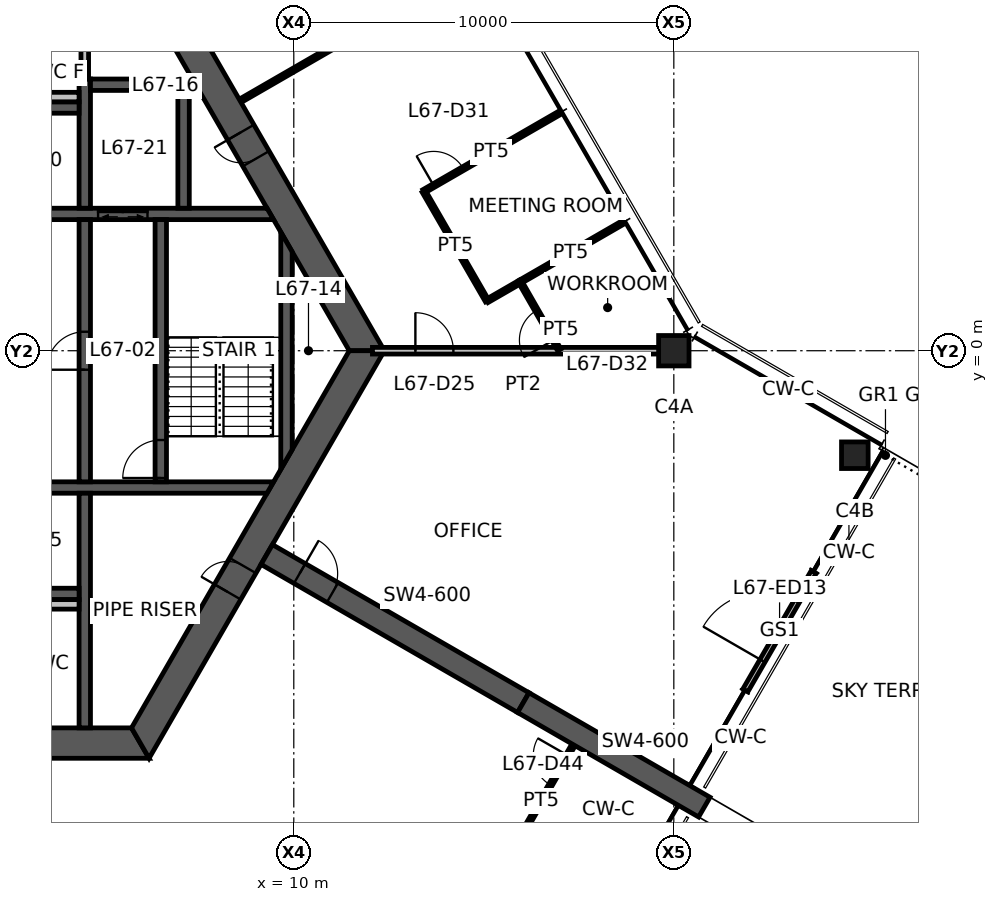
"""IFC4 building model, lengths in metres.
Left out: names, types, materials, properties, quantities, classifications, styles, units other than length and angle.
Written with IfcOpenShell. Run it as: python <this file> out.ifc"""

import sys

from ifc_helpers import new_model, si_unit, direction, frame, frame_2d, origin, origin_2d, place, context, subcontext, project, spatial, polyline, rectangle, hollow_rectangle, outline, extrude, element, fill, save


model = new_model("IFC4")
c1 = context("Model", 3, precision=1e-05, world=origin(), true_north=direction((0.0, 1.0)))
c2 = subcontext(c1, "Body", "Model", "MODEL_VIEW")
j1 = project(units=[si_unit("LENGTHUNIT", "METRE"), si_unit("PLANEANGLEUNIT", "RADIAN")], contexts=[c1])
p1 = place(None, origin())
s1 = spatial("IfcSite", under=j1, at=p1, CompositionType="ELEMENT")
p2 = place(p1, origin())
s2 = spatial("IfcBuilding", under=s1, at=p2, CompositionType="ELEMENT")
p3 = place(p2, frame((0.0, 0.0, 267.4)))
s3 = spatial("IfcBuildingStorey", under=s2, at=p3, CompositionType="ELEMENT", Elevation=267.4)
p4 = place(p3, frame((20.0, 0.0, 0.0), z_axis=(0.0, 0.0, 1.0), x_axis=(1.0, 0.0, 0.0)))
e1 = element("IfcColumn", 1, at=p4, inside=s3, PredefinedType="COLUMN", context=c2, shape_type="SweptSolid", body=[
    extrude(hollow_rectangle(XDim=0.8, YDim=0.8, WallThickness=0.04, at=origin_2d()), origin(), (0.0, 0.0, 1.0), 3.9),
])
p5 = place(p3, frame((24.763, -2.75, 0.0), z_axis=(0.0, 0.0, 1.0), x_axis=(1.0, 0.0, 0.0)))
e2 = element("IfcColumn", 2, at=p5, inside=s3, PredefinedType="COLUMN", context=c2, shape_type="SweptSolid", body=[
    extrude(hollow_rectangle(XDim=0.7, YDim=0.7, WallThickness=0.032, at=origin_2d()), origin(), (0.0, 0.0, 1.0), 3.9),
])
p6 = place(p3, frame((11.922, 0.0, 0.0), z_axis=(0.0, 0.0, 1.0), x_axis=(-0.500004296715, 0.866022923061, 0.0)))
e3 = element("IfcWall", 3, at=p6, inside=s3, PredefinedType="SHEAR", context=c2, shape_type="SweptSolid", body=[
    extrude(outline(polyline([(-0.231, -0.4), (5.835, -0.4), (6.635, -0.4), (12.153, -0.4), (11.691, 0.4), (6.635, 0.4), (5.835, 0.4), (0.231, 0.4), (-0.231, -0.4)])), origin(), (0.0, 0.0, 1.0), 3.9),
])
p7 = place(p6, frame((5.835, 0.0, 0.0)))
e4 = element("IfcOpeningElement", 4, at=p7, cuts=e3, PredefinedType="OPENING", context=c2, shape_type="SweptSolid", body=[
    extrude(rectangle(XDim=0.8, YDim=2.1, at=frame_2d((0.4, 1.05))), frame((0.0, 0.41, 0.0), z_axis=(0.0, -1.0, 0.0), x_axis=(1.0, 0.0, 0.0)), (0.0, 0.0, 1.0), 0.82),
])
p8 = place(p3, frame((-5.961, -10.325, 0.0), z_axis=(0.0, 0.0, 1.0), x_axis=(1.0, 0.0, 0.0)))
e5 = element("IfcWall", 5, at=p8, inside=s3, PredefinedType="SHEAR", context=c2, shape_type="SweptSolid", body=[
    extrude(outline(polyline([(-0.231, -0.4), (5.461, -0.4), (6.461, -0.4), (12.153, -0.4), (11.691, 0.4), (6.461, 0.4), (5.461, 0.4), (0.231, 0.4), (-0.231, -0.4)])), origin(), (0.0, 0.0, 1.0), 3.9),
])
p9 = place(p8, frame((5.461, 0.0, 0.0)))
e6 = element("IfcOpeningElement", 6, at=p9, cuts=e5, PredefinedType="OPENING", context=c2, shape_type="SweptSolid", body=[
    extrude(rectangle(XDim=1.0, YDim=2.1, at=frame_2d((0.5, 1.05))), frame((0.0, 0.41, 0.0), z_axis=(0.0, -1.0, 0.0), x_axis=(1.0, 0.0, 0.0)), (0.0, 0.0, 1.0), 0.82),
])
p10 = place(p3, frame((5.961, -10.325, 0.0), z_axis=(0.0, 0.0, 1.0), x_axis=(0.500004296715, 0.866022923061, 0.0)))
e7 = element("IfcWall", 7, at=p10, inside=s3, PredefinedType="SHEAR", context=c2, shape_type="SweptSolid", body=[
    extrude(outline(polyline([(-0.231, -0.4), (4.594, -0.4), (5.394, -0.4), (12.153, -0.4), (11.691, 0.4), (5.394, 0.4), (4.594, 0.4), (0.231, 0.4), (-0.231, -0.4)])), origin(), (0.0, 0.0, 1.0), 3.9),
])
p11 = place(p10, frame((4.594, 0.0, 0.0)))
e8 = element("IfcOpeningElement", 8, at=p11, cuts=e7, PredefinedType="OPENING", context=c2, shape_type="SweptSolid", body=[
    extrude(rectangle(XDim=0.8, YDim=2.1, at=frame_2d((0.4, 1.05))), frame((0.0, 0.41, 0.0), z_axis=(0.0, -1.0, 0.0), x_axis=(1.0, 0.0, 0.0)), (0.0, 0.0, 1.0), 0.82),
])
p12 = place(p3, frame((9.288, -5.363, 0.0), z_axis=(0.0, 0.0, 1.0), x_axis=(0.866031736626, -0.499989031036, 0.0)))
e9 = element("IfcWall", 9, at=p12, inside=s3, PredefinedType="SHEAR", context=c2, shape_type="SweptSolid", body=[
    extrude(rectangle(XDim=7.796, YDim=0.6, at=frame_2d((3.898, 0.0))), origin(), (0.0, 0.0, 1.0), 3.9),
])
p13 = place(p12, frame((1.0, 0.0, 0.0)))
e10 = element("IfcOpeningElement", 10, at=p13, cuts=e9, PredefinedType="OPENING", context=c2, shape_type="SweptSolid", body=[
    extrude(rectangle(XDim=1.0, YDim=2.1, at=frame_2d((0.5, 1.05))), frame((0.0, 0.31, 0.0), z_axis=(0.0, -1.0, 0.0), x_axis=(1.0, 0.0, 0.0)), (0.0, 0.0, 1.0), 0.62),
])
p14 = place(p3, frame((16.039, -9.26, 0.0), z_axis=(0.0, 0.0, 1.0), x_axis=(0.866027397988, -0.499996545922, 0.0)))
e11 = element("IfcWall", 11, at=p14, inside=s3, PredefinedType="SHEAR", context=c2, shape_type="SweptSolid", body=[
    extrude(rectangle(XDim=5.5, YDim=0.6, at=frame_2d((2.75, 0.0))), origin(), (0.0, 0.0, 1.0), 3.9),
])
p15 = place(p3, frame((21.883, -8.939, 0.0), z_axis=(0.0, 0.0, 1.0), x_axis=(0.500012057535, 0.866018442252, 0.0)))
e12 = element("IfcWall", 12, at=p15, inside=s3, PredefinedType="STANDARD", context=c2, shape_type="SweptSolid", body=[
    extrude(rectangle(XDim=3.6, YDim=0.15, at=frame_2d((1.8, 0.0))), origin(), (0.0, 0.0, 1.0), 3.9),
])
p16 = place(p15, frame((0.9, 0.0, 0.0)))
e13 = element("IfcOpeningElement", 13, at=p16, cuts=e12, PredefinedType="OPENING", context=c2, shape_type="SweptSolid", body=[
    extrude(rectangle(XDim=1.8, YDim=2.1, at=frame_2d((0.9, 1.05))), frame((0.0, 0.085, 0.0), z_axis=(0.0, -1.0, 0.0), x_axis=(1.0, 0.0, 0.0)), (0.0, 0.0, 1.0), 0.17),
])
p17 = place(p3, frame((1.45, 3.6, 0.0), z_axis=(0.0, 0.0, 1.0), x_axis=(1.0, 0.0, 0.0)))
e14 = element("IfcWall", 14, at=p17, inside=s3, PredefinedType="SHEAR", context=c2, shape_type="SweptSolid", body=[
    extrude(outline(polyline([(0.0, -0.15), (1.15, -0.15), (2.05, -0.15), (3.4, -0.15), (4.7, -0.15), (8.019, -0.15), (7.845, 0.15), (4.7, 0.15), (3.4, 0.15), (2.05, 0.15), (1.15, 0.15), (0.0, 0.15), (0.0, -0.15)])), origin(), (0.0, 0.0, 1.0), 3.9),
])
p18 = place(p17, frame((1.15, 0.0, 0.0)))
e15 = element("IfcOpeningElement", 15, at=p18, cuts=e14, PredefinedType="OPENING", context=c2, shape_type="SweptSolid", body=[
    extrude(rectangle(XDim=0.9, YDim=2.1, at=frame_2d((0.45, 1.05))), frame((0.0, 0.16, 0.0), z_axis=(0.0, -1.0, 0.0), x_axis=(1.0, 0.0, 0.0)), (0.0, 0.0, 1.0), 0.32),
])
p19 = place(p17, frame((3.4, 0.0, 0.0)))
e16 = element("IfcOpeningElement", 16, at=p19, cuts=e14, PredefinedType="OPENING", context=c2, shape_type="SweptSolid", body=[
    extrude(rectangle(XDim=1.3, YDim=2.1, at=frame_2d((0.65, 1.05))), frame((0.0, 0.16, 0.0), z_axis=(0.0, -1.0, 0.0), x_axis=(1.0, 0.0, 0.0)), (0.0, 0.0, 1.0), 0.32),
])
p20 = place(p3, frame((1.45, -3.6, 0.0), z_axis=(0.0, 0.0, 1.0), x_axis=(1.0, 0.0, 0.0)))
e17 = element("IfcWall", 17, at=p20, inside=s3, PredefinedType="SHEAR", context=c2, shape_type="SweptSolid", body=[
    extrude(outline(polyline([(0.0, -0.15), (1.05, -0.15), (2.15, -0.15), (7.845, -0.15), (8.019, 0.15), (2.15, 0.15), (1.05, 0.15), (0.0, 0.15), (0.0, -0.15)])), origin(), (0.0, 0.0, 1.0), 3.9),
])
p21 = place(p20, frame((1.05, 0.0, 0.0)))
e18 = element("IfcOpeningElement", 18, at=p21, cuts=e17, PredefinedType="OPENING", context=c2, shape_type="SweptSolid", body=[
    extrude(rectangle(XDim=1.1, YDim=2.1, at=frame_2d((0.55, 1.05))), frame((0.0, 0.16, 0.0), z_axis=(0.0, -1.0, 0.0), x_axis=(1.0, 0.0, 0.0)), (0.0, 0.0, 1.0), 0.32),
])
p22 = place(p3, frame((4.5, -3.45, 0.0), z_axis=(0.0, 0.0, 1.0), x_axis=(0.0, 1.0, 0.0)))
e19 = element("IfcWall", 19, at=p22, inside=s3, PredefinedType="SHEAR", context=c2, shape_type="SweptSolid", body=[
    extrude(rectangle(XDim=6.9, YDim=0.3, at=frame_2d((3.45, 0.0))), origin(), (0.0, 0.0, 1.0), 3.9),
])
p23 = place(p22, frame((2.95, 0.0, 0.0)))
e20 = element("IfcOpeningElement", 20, at=p23, cuts=e19, PredefinedType="OPENING", context=c2, shape_type="SweptSolid", body=[
    extrude(rectangle(XDim=1.0, YDim=2.1, at=frame_2d((0.5, 1.05))), frame((0.0, 0.16, 0.0), z_axis=(0.0, -1.0, 0.0), x_axis=(1.0, 0.0, 0.0)), (0.0, 0.0, 1.0), 0.32),
])
p24 = place(p3, frame((6.5, -3.45, 0.0), z_axis=(0.0, 0.0, 1.0), x_axis=(0.0, 1.0, 0.0)))
e21 = element("IfcWall", 21, at=p24, inside=s3, PredefinedType="SHEAR", context=c2, shape_type="SweptSolid", body=[
    extrude(rectangle(XDim=6.9, YDim=0.3, at=frame_2d((3.45, 0.0))), origin(), (0.0, 0.0, 1.0), 3.9),
])
p25 = place(p24, frame((0.1, 0.0, 0.0)))
e22 = element("IfcOpeningElement", 22, at=p25, cuts=e21, PredefinedType="OPENING", context=c2, shape_type="SweptSolid", body=[
    extrude(rectangle(XDim=1.0, YDim=2.1, at=frame_2d((0.5, 1.05))), frame((0.0, 0.16, 0.0), z_axis=(0.0, -1.0, 0.0), x_axis=(1.0, 0.0, 0.0)), (0.0, 0.0, 1.0), 0.32),
])
p26 = place(p3, frame((4.5, 3.75, 0.0), z_axis=(0.0, 0.0, 1.0), x_axis=(0.0, 1.0, 0.0)))
e23 = element("IfcWall", 23, at=p26, inside=s3, PredefinedType="SHEAR", context=c2, shape_type="SweptSolid", body=[
    extrude(rectangle(XDim=3.4, YDim=0.3, at=frame_2d((1.7, 0.0))), origin(), (0.0, 0.0, 1.0), 3.9),
])
p27 = place(p3, frame((4.5, -3.75, 0.0), z_axis=(0.0, 0.0, 1.0), x_axis=(0.0, -1.0, 0.0)))
e24 = element("IfcWall", 24, at=p27, inside=s3, PredefinedType="SHEAR", context=c2, shape_type="SweptSolid", body=[
    extrude(rectangle(XDim=6.175, YDim=0.3, at=frame_2d((3.087, 0.0))), origin(), (0.0, 0.0, 1.0), 3.9),
])
for number, where, z_axis, x_axis in (
    (25, (1.75, 6.4, 0.0), (0.0, 0.0, 1.0), (1.0, 0.0, 0.0)),
    (26, (1.75, -6.4, 0.0), (0.0, 0.0, 1.0), (1.0, 0.0, 0.0)),
    (27, (4.65, 7.0, 0.0), (0.0, 0.0, 1.0), (1.0, 0.0, 0.0)),
):
    element("IfcWall", number, at=place(p3, frame(where, z_axis=z_axis, x_axis=x_axis)), inside=s3, PredefinedType="SHEAR", context=c2, shape_type="SweptSolid", body=[
        extrude(rectangle(XDim=2.6, YDim=0.3, at=frame_2d((1.3, 0.0))), origin(), (0.0, 0.0, 1.0), 3.9),
    ])
p28 = place(p3, frame((7.1, 3.75, 0.0), z_axis=(0.0, 0.0, 1.0), x_axis=(0.0, 1.0, 0.0)))
e28 = element("IfcWall", 28, at=p28, inside=s3, PredefinedType="SHEAR", context=c2, shape_type="SweptSolid", body=[
    extrude(rectangle(XDim=3.1, YDim=0.3, at=frame_2d((1.55, 0.0))), origin(), (0.0, 0.0, 1.0), 3.9),
])
p29 = place(p3, frame((9.808, -2.862, 0.0), z_axis=(0.0, 0.0, 1.0), x_axis=(0.0, 1.0, 0.0)))
e29 = element("IfcWall", 29, at=p29, inside=s3, PredefinedType="SHEAR", context=c2, shape_type="SweptSolid", body=[
    extrude(outline(polyline([(0.26, -0.15), (5.465, -0.15), (5.984, 0.15), (-0.26, 0.15), (0.26, -0.15)])), origin(), (0.0, 0.0, 1.0), 3.9),
])
p30 = place(p3, frame((4.5, 7.15, 0.0), z_axis=(0.0, 0.0, 1.0), x_axis=(0.0, 1.0, 0.0)))
e30 = element("IfcWall", 30, at=p30, inside=s3, PredefinedType="STANDARD", context=c2, shape_type="SweptSolid", body=[
    extrude(rectangle(XDim=2.775, YDim=0.2, at=frame_2d((1.388, 0.0))), origin(), (0.0, 0.0, 1.0), 3.9),
])
for number, where, z_axis, x_axis in (
    (31, (1.75, 6.675, 0.0), (0.0, 0.0, 1.0), (1.0, 0.0, 0.0)),
    (32, (1.75, -6.675, 0.0), (0.0, 0.0, 1.0), (1.0, 0.0, 0.0)),
):
    element("IfcWall", number, at=place(p3, frame(where, z_axis=z_axis, x_axis=x_axis)), inside=s3, PredefinedType="PLUMBINGWALL", context=c2, shape_type="SweptSolid", body=[
        extrude(rectangle(XDim=2.6, YDim=0.25, at=frame_2d((1.3, 0.0))), origin(), (0.0, 0.0, 1.0), 3.9),
    ])
p31 = place(p3, frame((12.07, 0.0, 0.0), z_axis=(0.0, 0.0, 1.0), x_axis=(1.0, 0.0, 0.0)))
e33 = element("IfcWall", 33, at=p31, inside=s3, PredefinedType="PARTITIONING", context=c2, shape_type="SweptSolid", body=[
    extrude(rectangle(XDim=7.93, YDim=0.175, at=frame_2d((3.965, 0.0))), origin(), (0.0, 0.0, 1.0), 3.05),
])
p32 = place(p31, frame((1.13, 0.0, 0.0)))
e34 = element("IfcOpeningElement", 34, at=p32, cuts=e33, PredefinedType="OPENING", context=c2, shape_type="SweptSolid", body=[
    extrude(rectangle(XDim=1.0, YDim=2.1, at=frame_2d((0.5, 1.05))), frame((0.0, 0.098, 0.0), z_axis=(0.0, -1.0, 0.0), x_axis=(1.0, 0.0, 0.0)), (0.0, 0.0, 1.0), 0.195),
])
p33 = place(p3, frame((11.013, 7.975, 0.0), z_axis=(0.0, 0.0, 1.0), x_axis=(-0.86603494908, -0.499983466698, 0.0)))
e35 = element("IfcWall", 35, at=p33, inside=s3, PredefinedType="PARTITIONING", context=c2, shape_type="SweptSolid", body=[
    extrude(rectangle(XDim=2.78, YDim=0.1, at=frame_2d((1.39, 0.0))), origin(), (0.0, 0.0, 1.0), 2.95),
])
p34 = place(p3, frame((18.62, 3.351, 0.0), z_axis=(0.0, 0.0, 1.0), x_axis=(-0.866043267704, -0.499969057507, 0.0)))
e36 = element("IfcWall", 36, at=p34, inside=s3, PredefinedType="PARTITIONING", context=c2, shape_type="SweptSolid", body=[
    extrude(rectangle(XDim=3.085, YDim=0.1, at=frame_2d((1.542, 0.0))), origin(), (0.0, 0.0, 1.0), 2.95),
])
p35 = place(p3, frame((13.421, 4.195, 0.0), z_axis=(0.0, 0.0, 1.0), x_axis=(0.866045435662, 0.499965302165, 0.0)))
e37 = element("IfcWall", 37, at=p35, inside=s3, PredefinedType="PARTITIONING", context=c2, shape_type="SweptSolid", body=[
    extrude(rectangle(XDim=4.09, YDim=0.1, at=frame_2d((2.045, 0.0))), origin(), (0.0, 0.0, 1.0), 2.95),
])
p36 = place(p35, frame((0.3, 0.0, 0.0)))
e38 = element("IfcOpeningElement", 38, at=p36, cuts=e37, PredefinedType="OPENING", context=c2, shape_type="SweptSolid", body=[
    extrude(rectangle(XDim=0.9, YDim=2.1, at=frame_2d((0.45, 1.05))), frame((0.0, 0.06, 0.0), z_axis=(0.0, -1.0, 0.0), x_axis=(1.0, 0.0, 0.0)), (0.0, 0.0, 1.0), 0.12),
])
p37 = place(p3, frame((15.086, 1.311, 0.0), z_axis=(0.0, 0.0, 1.0), x_axis=(-0.500001606164, 0.866024476463, 0.0)))
e39 = element("IfcWall", 39, at=p37, inside=s3, PredefinedType="PARTITIONING", context=c2, shape_type="SweptSolid", body=[
    extrude(rectangle(XDim=3.331, YDim=0.1, at=frame_2d((1.666, 0.0))), origin(), (0.0, 0.0, 1.0), 2.95),
])
p38 = place(p3, frame((15.956, 1.813, 0.0), z_axis=(0.0, 0.0, 1.0), x_axis=(-0.866035824272, -0.499981950752, 0.0)))
e40 = element("IfcWall", 40, at=p38, inside=s3, PredefinedType="PARTITIONING", context=c2, shape_type="SweptSolid", body=[
    extrude(rectangle(XDim=1.004, YDim=0.1, at=frame_2d((0.502, 0.0))), origin(), (0.0, 0.0, 1.0), 2.95),
])
p39 = place(p3, frame((16.986, 0.02, 0.0), z_axis=(0.0, 0.0, 1.0), x_axis=(-0.498096123952, 0.867121820337, 0.0)))
e41 = element("IfcWall", 41, at=p39, inside=s3, PredefinedType="PARTITIONING", context=c2, shape_type="SweptSolid", body=[
    extrude(rectangle(XDim=2.067, YDim=0.1, at=frame_2d((1.034, 0.0))), origin(), (0.0, 0.0, 1.0), 2.95),
])
p40 = place(p39, frame((0.3, 0.0, 0.0)))
e42 = element("IfcOpeningElement", 42, at=p40, cuts=e41, PredefinedType="OPENING", context=c2, shape_type="SweptSolid", body=[
    extrude(rectangle(XDim=0.9, YDim=2.1, at=frame_2d((0.45, 1.05))), frame((0.0, 0.06, 0.0), z_axis=(0.0, -1.0, 0.0), x_axis=(1.0, 0.0, 0.0)), (0.0, 0.0, 1.0), 0.12),
])
p41 = place(p3, frame((15.665, -13.317, 0.0), z_axis=(0.0, 0.0, 1.0), x_axis=(0.498882251571, 0.866669775098, 0.0)))
e43 = element("IfcWall", 43, at=p41, inside=s3, PredefinedType="PARTITIONING", context=c2, shape_type="SweptSolid", body=[
    extrude(rectangle(XDim=3.38, YDim=0.1, at=frame_2d((1.69, 0.0))), origin(), (0.0, 0.0, 1.0), 2.95),
])
p42 = place(p41, frame((2.18, 0.0, 0.0)))
e44 = element("IfcOpeningElement", 44, at=p42, cuts=e43, PredefinedType="OPENING", context=c2, shape_type="SweptSolid", body=[
    extrude(rectangle(XDim=0.9, YDim=2.1, at=frame_2d((0.45, 1.05))), frame((0.0, 0.06, 0.0), z_axis=(0.0, -1.0, 0.0), x_axis=(1.0, 0.0, 0.0)), (0.0, 0.0, 1.0), 0.12),
])
p43 = place(p16, origin())
e45 = element("IfcDoor", 45, at=p43, inside=s3, OperationType="DOUBLE_DOOR_SINGLE_SWING", PredefinedType="DOOR", context=c2, shape_type="SweptSolid", body=[
    extrude(rectangle(XDim=1.8, YDim=2.1, at=frame_2d((0.9, 1.05))), frame((0.0, 0.025, 0.0), z_axis=(0.0, -1.0, 0.0), x_axis=(1.0, 0.0, 0.0)), (0.0, 0.0, 1.0), 0.05),
])
fill(e13, e45)
p44 = place(p7, origin())
e46 = element("IfcDoor", 46, at=p44, inside=s3, OperationType="SINGLE_SWING_RIGHT", PredefinedType="DOOR", context=c2, shape_type="SweptSolid", body=[
    extrude(rectangle(XDim=0.8, YDim=2.1, at=frame_2d((0.4, 1.05))), frame((0.0, 0.025, 0.0), z_axis=(0.0, -1.0, 0.0), x_axis=(1.0, 0.0, 0.0)), (0.0, 0.0, 1.0), 0.05),
])
fill(e4, e46)
p45 = place(p11, origin())
e47 = element("IfcDoor", 47, at=p45, inside=s3, OperationType="SINGLE_SWING_LEFT", PredefinedType="DOOR", context=c2, shape_type="SweptSolid", body=[
    extrude(rectangle(XDim=0.8, YDim=2.1, at=frame_2d((0.4, 1.05))), frame((0.0, 0.025, 0.0), z_axis=(0.0, -1.0, 0.0), x_axis=(1.0, 0.0, 0.0)), (0.0, 0.0, 1.0), 0.05),
])
fill(e8, e47)
p46 = place(p23, origin())
e48 = element("IfcDoor", 48, at=p46, inside=s3, OperationType="SINGLE_SWING_LEFT", PredefinedType="DOOR", context=c2, shape_type="SweptSolid", body=[
    extrude(rectangle(XDim=1.0, YDim=2.1, at=frame_2d((0.5, 1.05))), frame((0.0, 0.025, 0.0), z_axis=(0.0, -1.0, 0.0), x_axis=(1.0, 0.0, 0.0)), (0.0, 0.0, 1.0), 0.05),
])
fill(e20, e48)
p47 = place(p25, origin())
e49 = element("IfcDoor", 49, at=p47, inside=s3, OperationType="SINGLE_SWING_LEFT", PredefinedType="DOOR", context=c2, shape_type="SweptSolid", body=[
    extrude(rectangle(XDim=1.0, YDim=2.1, at=frame_2d((0.5, 1.05))), frame((0.0, 0.025, 0.0), z_axis=(0.0, -1.0, 0.0), x_axis=(1.0, 0.0, 0.0)), (0.0, 0.0, 1.0), 0.05),
])
fill(e22, e49)
p48 = place(p13, origin())
e50 = element("IfcDoor", 50, at=p48, inside=s3, OperationType="SINGLE_SWING_LEFT", PredefinedType="DOOR", context=c2, shape_type="SweptSolid", body=[
    extrude(rectangle(XDim=1.0, YDim=2.1, at=frame_2d((0.5, 1.05))), frame((0.0, 0.025, 0.0), z_axis=(0.0, -1.0, 0.0), x_axis=(1.0, 0.0, 0.0)), (0.0, 0.0, 1.0), 0.05),
])
fill(e10, e50)
p49 = place(p32, origin())
e51 = element("IfcDoor", 51, at=p49, inside=s3, OperationType="SINGLE_SWING_LEFT", PredefinedType="DOOR", context=c2, shape_type="SweptSolid", body=[
    extrude(rectangle(XDim=1.0, YDim=2.1, at=frame_2d((0.5, 1.05))), frame((0.0, 0.025, 0.0), z_axis=(0.0, -1.0, 0.0), x_axis=(1.0, 0.0, 0.0)), (0.0, 0.0, 1.0), 0.05),
])
fill(e34, e51)
p50 = place(p36, origin())
e52 = element("IfcDoor", 52, at=p50, inside=s3, OperationType="SINGLE_SWING_LEFT", PredefinedType="DOOR", context=c2, shape_type="SweptSolid", body=[
    extrude(rectangle(XDim=0.9, YDim=2.1, at=frame_2d((0.45, 1.05))), frame((0.0, 0.025, 0.0), z_axis=(0.0, -1.0, 0.0), x_axis=(1.0, 0.0, 0.0)), (0.0, 0.0, 1.0), 0.05),
])
fill(e38, e52)
p51 = place(p40, origin())
e53 = element("IfcDoor", 53, at=p51, inside=s3, OperationType="SINGLE_SWING_LEFT", PredefinedType="DOOR", context=c2, shape_type="SweptSolid", body=[
    extrude(rectangle(XDim=0.9, YDim=2.1, at=frame_2d((0.45, 1.05))), frame((0.0, 0.025, 0.0), z_axis=(0.0, -1.0, 0.0), x_axis=(1.0, 0.0, 0.0)), (0.0, 0.0, 1.0), 0.05),
])
fill(e42, e53)
p52 = place(p42, origin())
e54 = element("IfcDoor", 54, at=p52, inside=s3, OperationType="SINGLE_SWING_RIGHT", PredefinedType="DOOR", context=c2, shape_type="SweptSolid", body=[
    extrude(rectangle(XDim=0.9, YDim=2.1, at=frame_2d((0.45, 1.05))), frame((0.0, 0.025, 0.0), z_axis=(0.0, -1.0, 0.0), x_axis=(1.0, 0.0, 0.0)), (0.0, 0.0, 1.0), 0.05),
])
fill(e44, e54)
p53 = place(p19, origin())
e55 = element("IfcDoor", 55, at=p53, inside=s3, OperationType="DOUBLE_DOOR_SLIDING", PredefinedType="DOOR", context=c2, shape_type="SweptSolid", body=[
    extrude(rectangle(XDim=1.3, YDim=2.1, at=frame_2d((0.65, 1.05))), frame((0.0, 0.025, 0.0), z_axis=(0.0, -1.0, 0.0), x_axis=(1.0, 0.0, 0.0)), (0.0, 0.0, 1.0), 0.05),
])
fill(e16, e55)
save(model, sys.argv[1])
